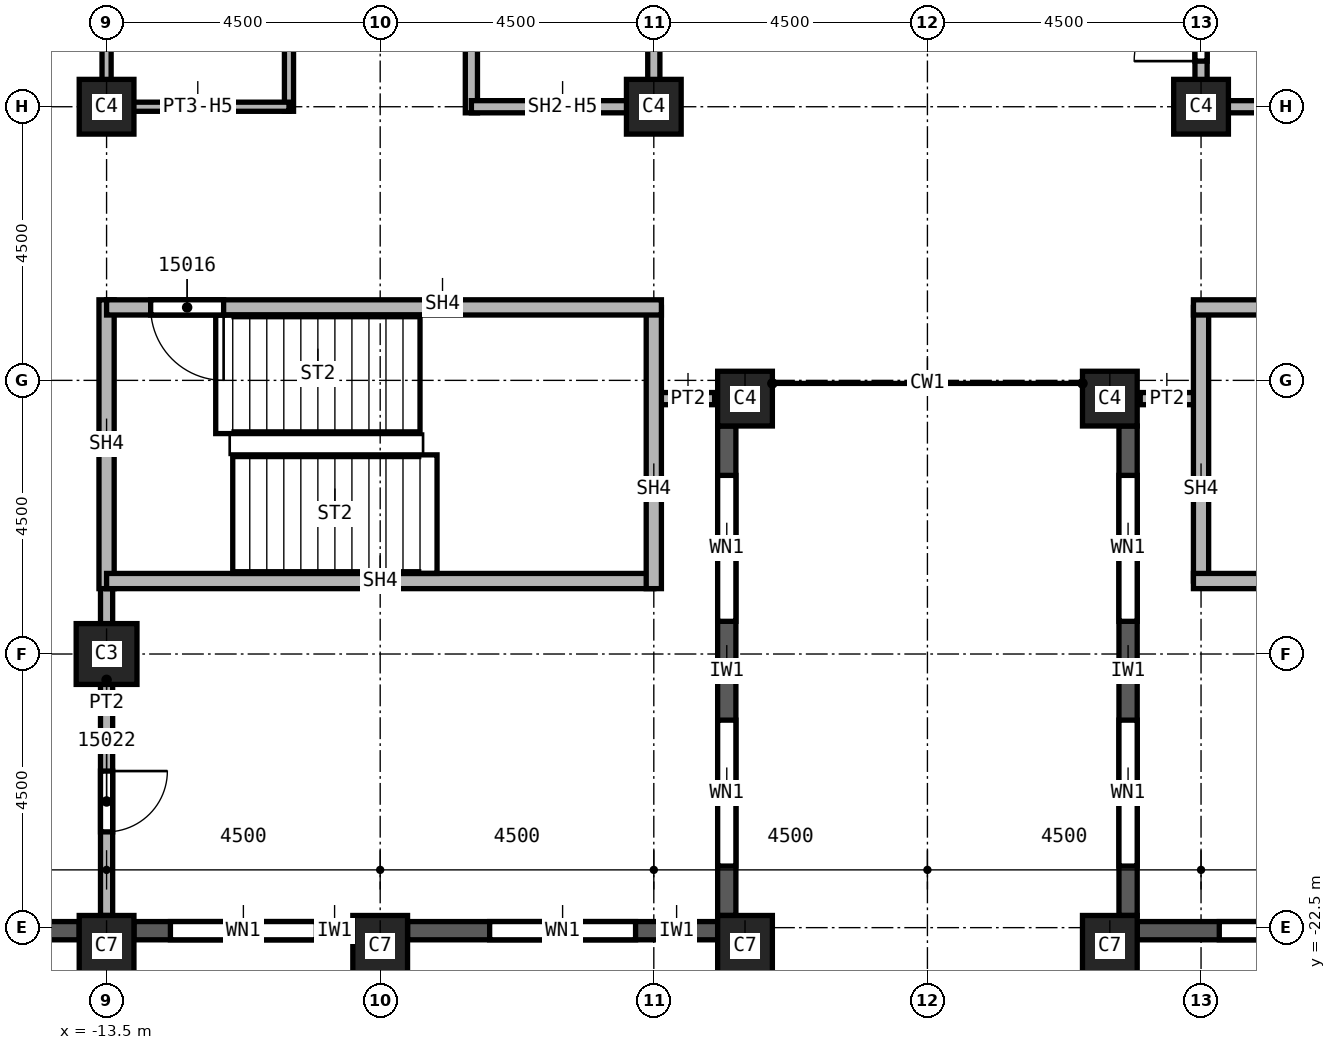
"""IFC4 building model, lengths in metres.
Left out: names, types, materials, properties, quantities, classifications, styles, units other than length and angle.
Written with IfcOpenShell. Run it as: python <this file> out.ifc"""

import sys

from ifc_helpers import new_model, si_unit, direction, frame, frame_2d, origin, origin_2d, place, context, subcontext, project, spatial, rectangle, extrude, element, fill, save


model = new_model("IFC4")
c1 = context("Model", 3, precision=1e-05, world=origin(), true_north=direction((0.0, 1.0)))
c2 = subcontext(c1, "Body", "Model", "MODEL_VIEW")
j1 = project(units=[si_unit("LENGTHUNIT", "METRE"), si_unit("PLANEANGLEUNIT", "RADIAN")], contexts=[c1])
p1 = place(None, origin())
s1 = spatial("IfcSite", under=j1, at=p1, CompositionType="ELEMENT")
p2 = place(p1, origin())
s2 = spatial("IfcBuilding", under=s1, at=p2, CompositionType="ELEMENT")
p3 = place(p2, frame((0.0, 0.0, 228.0)))
s3 = spatial("IfcBuildingStorey", under=s2, at=p3, CompositionType="ELEMENT", Elevation=228.0)
p4 = place(p3, frame((-13.5, -18.0, 0.0), z_axis=(0.0, 0.0, 1.0), x_axis=(1.0, 0.0, 0.0)))
e1 = element("IfcColumn", 1, at=p4, inside=s3, PredefinedType="COLUMN", context=c2, shape_type="SweptSolid", body=[
    extrude(rectangle(XDim=1.0, YDim=1.0, at=origin_2d()), origin(), (0.0, 0.0, 1.0), 3.72),
])
for number, where, z_axis, x_axis in (
    (2, (4.5, -9.0, 0.0), (0.0, 0.0, 1.0), (1.0, 0.0, 0.0)),
    (3, (-4.5, -9.0, 0.0), (0.0, 0.0, 1.0), (1.0, 0.0, 0.0)),
    (4, (-13.5, -9.0, 0.0), (0.0, 0.0, 1.0), (1.0, 0.0, 0.0)),
):
    element("IfcColumn", number, at=place(p3, frame(where, z_axis=z_axis, x_axis=x_axis)), inside=s3, PredefinedType="COLUMN", context=c2, shape_type="SweptSolid", body=[
        extrude(rectangle(XDim=0.9, YDim=0.9, at=origin_2d()), origin(), (0.0, 0.0, 1.0), 3.72),
    ])
for number, where, z_axis, x_axis in (
    (5, (3.0, -22.8, 0.0), (0.0, 0.0, 1.0), (1.0, 0.0, 0.0)),
    (6, (-3.0, -22.8, 0.0), (0.0, 0.0, 1.0), (1.0, 0.0, 0.0)),
    (7, (-9.0, -22.8, 0.0), (0.0, 0.0, 1.0), (1.0, 0.0, 0.0)),
    (8, (-13.5, -22.8, 0.0), (0.0, 0.0, 1.0), (1.0, 0.0, 0.0)),
):
    element("IfcColumn", number, at=place(p3, frame(where, z_axis=z_axis, x_axis=x_axis)), inside=s3, PredefinedType="COLUMN", context=c2, shape_type="SweptSolid", body=[
        extrude(rectangle(XDim=0.9, YDim=1.0, at=origin_2d()), origin(), (0.0, 0.0, 1.0), 3.72),
    ])
for number, where, z_axis, x_axis in (
    (9, (3.0, -13.8, 0.0), (0.0, 0.0, 1.0), (1.0, 0.0, 0.0)),
    (10, (-3.0, -13.8, 0.0), (0.0, 0.0, 1.0), (1.0, 0.0, 0.0)),
):
    element("IfcColumn", number, at=place(p3, frame(where, z_axis=z_axis, x_axis=x_axis)), inside=s3, PredefinedType="COLUMN", context=c2, shape_type="SweptSolid", body=[
        extrude(rectangle(XDim=0.9, YDim=0.9, at=origin_2d()), origin(), (0.0, 0.0, 1.0), 3.72),
    ])
p5 = place(p3, frame((-17.55, -22.55, 0.0), z_axis=(0.0, 0.0, 1.0), x_axis=(1.0, 0.0, 0.0)))
e11 = element("IfcWall", 11, at=p5, inside=s3, PredefinedType="SOLIDWALL", context=c2, shape_type="SweptSolid", body=[
    extrude(rectangle(XDim=3.6, YDim=0.3, at=frame_2d((1.8, 0.0))), origin(), (0.0, 0.0, 1.0), 3.12),
])
p6 = place(p5, frame((0.775, 0.0, 0.8)))
e12 = element("IfcOpeningElement", 12, at=p6, cuts=e11, PredefinedType="OPENING", context=c2, shape_type="SweptSolid", body=[
    extrude(rectangle(XDim=1.0, YDim=1.95, at=frame_2d((0.5, 0.975))), frame((0.0, 0.15, 0.0), z_axis=(0.0, -1.0, 0.0), x_axis=(1.0, 0.0, 0.0)), (0.0, 0.0, 1.0), 0.3),
])
p7 = place(p5, frame((2.375, 0.0, 0.8)))
e13 = element("IfcOpeningElement", 13, at=p7, cuts=e11, PredefinedType="OPENING", context=c2, shape_type="SweptSolid", body=[
    extrude(rectangle(XDim=0.6, YDim=1.95, at=frame_2d((0.3, 0.975))), frame((0.0, 0.15, 0.0), z_axis=(0.0, -1.0, 0.0), x_axis=(1.0, 0.0, 0.0)), (0.0, 0.0, 1.0), 0.3),
])
p8 = place(p3, frame((-13.05, -22.55, 0.0), z_axis=(0.0, 0.0, 1.0), x_axis=(1.0, 0.0, 0.0)))
e14 = element("IfcWall", 14, at=p8, inside=s3, PredefinedType="SOLIDWALL", context=c2, shape_type="SweptSolid", body=[
    extrude(rectangle(XDim=3.6, YDim=0.3, at=frame_2d((1.8, 0.0))), origin(), (0.0, 0.0, 1.0), 3.12),
])
p9 = place(p8, frame((0.6, 0.0, 0.8)))
e15 = element("IfcOpeningElement", 15, at=p9, cuts=e14, PredefinedType="OPENING", context=c2, shape_type="SweptSolid", body=[
    extrude(rectangle(XDim=2.4, YDim=1.95, at=frame_2d((1.2, 0.975))), frame((0.0, 0.15, 0.0), z_axis=(0.0, -1.0, 0.0), x_axis=(1.0, 0.0, 0.0)), (0.0, 0.0, 1.0), 0.3),
])
p10 = place(p3, frame((-8.55, -22.55, 0.0), z_axis=(0.0, 0.0, 1.0), x_axis=(1.0, 0.0, 0.0)))
e16 = element("IfcWall", 16, at=p10, inside=s3, PredefinedType="SOLIDWALL", context=c2, shape_type="SweptSolid", body=[
    extrude(rectangle(XDim=5.1, YDim=0.3, at=frame_2d((2.55, 0.0))), origin(), (0.0, 0.0, 1.0), 3.12),
])
p11 = place(p10, frame((1.35, 0.0, 0.8)))
e17 = element("IfcOpeningElement", 17, at=p11, cuts=e16, PredefinedType="OPENING", context=c2, shape_type="SweptSolid", body=[
    extrude(rectangle(XDim=2.4, YDim=1.95, at=frame_2d((1.2, 0.975))), frame((0.0, 0.15, 0.0), z_axis=(0.0, -1.0, 0.0), x_axis=(1.0, 0.0, 0.0)), (0.0, 0.0, 1.0), 0.3),
])
p12 = place(p3, frame((-3.3, -22.3, 0.0), z_axis=(0.0, 0.0, 1.0), x_axis=(0.0, 1.0, 0.0)))
e18 = element("IfcWall", 18, at=p12, inside=s3, PredefinedType="SOLIDWALL", context=c2, shape_type="SweptSolid", body=[
    extrude(rectangle(XDim=8.05, YDim=0.3, at=frame_2d((4.025, 0.0))), origin(), (0.0, 0.0, 1.0), 3.12),
])
p13 = place(p12, frame((0.812, 0.0, 0.8)))
e19 = element("IfcOpeningElement", 19, at=p13, cuts=e18, PredefinedType="OPENING", context=c2, shape_type="SweptSolid", body=[
    extrude(rectangle(XDim=2.4, YDim=1.95, at=frame_2d((1.2, 0.975))), frame((0.0, 0.15, 0.0), z_axis=(0.0, -1.0, 0.0), x_axis=(1.0, 0.0, 0.0)), (0.0, 0.0, 1.0), 0.3),
])
p14 = place(p12, frame((4.837, 0.0, 0.8)))
e20 = element("IfcOpeningElement", 20, at=p14, cuts=e18, PredefinedType="OPENING", context=c2, shape_type="SweptSolid", body=[
    extrude(rectangle(XDim=2.4, YDim=1.95, at=frame_2d((1.2, 0.975))), frame((0.0, 0.15, 0.0), z_axis=(0.0, -1.0, 0.0), x_axis=(1.0, 0.0, 0.0)), (0.0, 0.0, 1.0), 0.3),
])
p15 = place(p3, frame((3.3, -14.25, 0.0), z_axis=(0.0, 0.0, 1.0), x_axis=(0.0, -1.0, 0.0)))
e21 = element("IfcWall", 21, at=p15, inside=s3, PredefinedType="SOLIDWALL", context=c2, shape_type="SweptSolid", body=[
    extrude(rectangle(XDim=8.05, YDim=0.3, at=frame_2d((4.025, 0.0))), origin(), (0.0, 0.0, 1.0), 3.12),
])
p16 = place(p15, frame((0.812, 0.0, 0.8)))
e22 = element("IfcOpeningElement", 22, at=p16, cuts=e21, PredefinedType="OPENING", context=c2, shape_type="SweptSolid", body=[
    extrude(rectangle(XDim=2.4, YDim=1.95, at=frame_2d((1.2, 0.975))), frame((0.0, 0.15, 0.0), z_axis=(0.0, -1.0, 0.0), x_axis=(1.0, 0.0, 0.0)), (0.0, 0.0, 1.0), 0.3),
])
p17 = place(p15, frame((4.837, 0.0, 0.8)))
e23 = element("IfcOpeningElement", 23, at=p17, cuts=e21, PredefinedType="OPENING", context=c2, shape_type="SweptSolid", body=[
    extrude(rectangle(XDim=2.4, YDim=1.95, at=frame_2d((1.2, 0.975))), frame((0.0, 0.15, 0.0), z_axis=(0.0, -1.0, 0.0), x_axis=(1.0, 0.0, 0.0)), (0.0, 0.0, 1.0), 0.3),
])
p18 = place(p3, frame((3.45, -22.55, 0.0), z_axis=(0.0, 0.0, 1.0), x_axis=(1.0, 0.0, 0.0)))
e24 = element("IfcWall", 24, at=p18, inside=s3, PredefinedType="SOLIDWALL", context=c2, shape_type="SweptSolid", body=[
    extrude(rectangle(XDim=5.1, YDim=0.3, at=frame_2d((2.55, 0.0))), origin(), (0.0, 0.0, 1.0), 3.12),
])
p19 = place(p18, frame((1.35, 0.0, 0.8)))
e25 = element("IfcOpeningElement", 25, at=p19, cuts=e24, PredefinedType="OPENING", context=c2, shape_type="SweptSolid", body=[
    extrude(rectangle(XDim=2.4, YDim=1.95, at=frame_2d((1.2, 0.975))), frame((0.0, 0.15, 0.0), z_axis=(0.0, -1.0, 0.0), x_axis=(1.0, 0.0, 0.0)), (0.0, 0.0, 1.0), 0.3),
])
p20 = place(p3, frame((-13.5, -16.675, 0.0), z_axis=(0.0, 0.0, 1.0), x_axis=(0.0, -1.0, 0.0)))
e26 = element("IfcWall", 26, at=p20, inside=s3, PredefinedType="PARTITIONING", context=c2, shape_type="SweptSolid", body=[
    extrude(rectangle(XDim=5.625, YDim=0.2, at=frame_2d((2.812, 0.0))), origin(), (0.0, 0.0, 1.0), 3.72),
])
p21 = place(p20, frame((3.25, 0.0, 0.0)))
e27 = element("IfcOpeningElement", 27, at=p21, cuts=e26, PredefinedType="OPENING", context=c2, shape_type="SweptSolid", body=[
    extrude(rectangle(XDim=1.0, YDim=2.1, at=frame_2d((0.5, 1.05))), frame((0.0, 0.1, 0.0), z_axis=(0.0, -1.0, 0.0), x_axis=(1.0, 0.0, 0.0)), (0.0, 0.0, 1.0), 0.2),
])
for number, where, z_axis, x_axis in (
    (28, (-3.5, -13.8, 0.0), (0.0, 0.0, 1.0), (-1.0, 0.0, 0.0)),
    (29, (4.5, -13.8, 0.0), (0.0, 0.0, 1.0), (-1.0, 0.0, 0.0)),
):
    element("IfcWall", number, at=place(p3, frame(where, z_axis=z_axis, x_axis=x_axis)), inside=s3, PredefinedType="PARTITIONING", context=c2, shape_type="SweptSolid", body=[
        extrude(rectangle(XDim=1.0, YDim=0.2, at=frame_2d((0.5, 0.0))), origin(), (0.0, 0.0, 1.0), 3.72),
    ])
p22 = place(p3, frame((-7.5, -9.1, 0.0), z_axis=(0.0, 0.0, 1.0), x_axis=(0.0, 1.0, 0.0)))
e30 = element("IfcWall", 30, at=p22, inside=s3, PredefinedType="SOLIDWALL", context=c2, shape_type="SweptSolid", body=[
    extrude(rectangle(XDim=6.225, YDim=0.2, at=frame_2d((3.113, 0.0))), origin(), (0.0, 0.0, 1.0), 3.72),
])
p23 = place(p3, frame((-4.5, -9.0, 0.0), z_axis=(0.0, 0.0, 1.0), x_axis=(-1.0, 0.0, 0.0)))
e31 = element("IfcWall", 31, at=p23, inside=s3, PredefinedType="SOLIDWALL", context=c2, shape_type="SweptSolid", body=[
    extrude(rectangle(XDim=3.0, YDim=0.2, at=frame_2d((1.5, 0.0))), origin(), (0.0, 0.0, 1.0), 2.958),
])
p24 = place(p3, frame((-4.5, 0.0, 0.0), z_axis=(0.0, 0.0, 1.0), x_axis=(0.0, -1.0, 0.0)))
e32 = element("IfcWall", 32, at=p24, inside=s3, PredefinedType="SOLIDWALL", context=c2, shape_type="SweptSolid", body=[
    extrude(rectangle(XDim=9.1, YDim=0.2, at=frame_2d((4.55, 0.0))), origin(), (0.0, 0.0, 1.0), 2.958),
])
p25 = place(p24, frame((1.3, 0.0, 0.0)))
e33 = element("IfcOpeningElement", 33, at=p25, cuts=e32, PredefinedType="OPENING", context=c2, shape_type="SweptSolid", body=[
    extrude(rectangle(XDim=1.1, YDim=2.1, at=frame_2d((0.55, 1.05))), frame((0.0, 0.1, 0.0), z_axis=(0.0, -1.0, 0.0), x_axis=(1.0, 0.0, 0.0)), (0.0, 0.0, 1.0), 0.2),
])
p26 = place(p3, frame((4.5, -9.1, 0.0), z_axis=(0.0, 0.0, 1.0), x_axis=(0.0, 1.0, 0.0)))
e34 = element("IfcWall", 34, at=p26, inside=s3, PredefinedType="SOLIDWALL", context=c2, shape_type="SweptSolid", body=[
    extrude(rectangle(XDim=3.1, YDim=0.2, at=frame_2d((1.55, 0.0))), origin(), (0.0, 0.0, 1.0), 2.958),
])
p27 = place(p26, frame((0.85, 0.0, 0.0)))
e35 = element("IfcOpeningElement", 35, at=p27, cuts=e34, PredefinedType="OPENING", context=c2, shape_type="SweptSolid", body=[
    extrude(rectangle(XDim=1.1, YDim=2.1, at=frame_2d((0.55, 1.05))), frame((0.0, 0.1, 0.0), z_axis=(0.0, -1.0, 0.0), x_axis=(1.0, 0.0, 0.0)), (0.0, 0.0, 1.0), 0.2),
])
p28 = place(p3, frame((7.5, -9.0, 0.0), z_axis=(0.0, 0.0, 1.0), x_axis=(-1.0, 0.0, 0.0)))
e36 = element("IfcWall", 36, at=p28, inside=s3, PredefinedType="SOLIDWALL", context=c2, shape_type="SweptSolid", body=[
    extrude(rectangle(XDim=3.0, YDim=0.2, at=frame_2d((1.5, 0.0))), origin(), (0.0, 0.0, 1.0), 2.958),
])
p29 = place(p3, frame((-13.5, -12.175, 0.0), z_axis=(0.0, 0.0, 1.0), x_axis=(0.0, -1.0, 0.0)))
e37 = element("IfcWall", 37, at=p29, inside=s3, PredefinedType="SOLIDWALL", context=c2, shape_type="SweptSolid", body=[
    extrude(rectangle(XDim=4.75, YDim=0.25, at=frame_2d((2.375, 0.0))), origin(), (0.0, 0.0, 1.0), 3.72),
])
p30 = place(p3, frame((-4.5, -16.8, 0.0), z_axis=(0.0, 0.0, 1.0), x_axis=(-1.0, 0.0, 0.0)))
e38 = element("IfcWall", 38, at=p30, inside=s3, PredefinedType="SOLIDWALL", context=c2, shape_type="SweptSolid", body=[
    extrude(rectangle(XDim=9.0, YDim=0.25, at=frame_2d((4.5, 0.0))), origin(), (0.0, 0.0, 1.0), 3.72),
])
p31 = place(p3, frame((-4.5, -12.3, 0.0), z_axis=(0.0, 0.0, 1.0), x_axis=(0.0, -1.0, 0.0)))
e39 = element("IfcWall", 39, at=p31, inside=s3, PredefinedType="SOLIDWALL", context=c2, shape_type="SweptSolid", body=[
    extrude(rectangle(XDim=4.625, YDim=0.25, at=frame_2d((2.312, 0.0))), origin(), (0.0, 0.0, 1.0), 3.72),
])
p32 = place(p3, frame((-4.375, -12.3, 0.0), z_axis=(0.0, 0.0, 1.0), x_axis=(-1.0, 0.0, 0.0)))
e40 = element("IfcWall", 40, at=p32, inside=s3, PredefinedType="SOLIDWALL", context=c2, shape_type="SweptSolid", body=[
    extrude(rectangle(XDim=9.125, YDim=0.25, at=frame_2d((4.562, 0.0))), origin(), (0.0, 0.0, 1.0), 3.72),
])
p33 = place(p32, frame((7.2, 0.0, 0.0)))
e41 = element("IfcOpeningElement", 41, at=p33, cuts=e40, PredefinedType="OPENING", context=c2, shape_type="SweptSolid", body=[
    extrude(rectangle(XDim=1.2, YDim=2.1, at=frame_2d((0.6, 1.05))), frame((0.0, 0.125, 0.0), z_axis=(0.0, -1.0, 0.0), x_axis=(1.0, 0.0, 0.0)), (0.0, 0.0, 1.0), 0.25),
])
p34 = place(p3, frame((4.5, -16.8, 0.0), z_axis=(0.0, 0.0, 1.0), x_axis=(0.0, 1.0, 0.0)))
e42 = element("IfcWall", 42, at=p34, inside=s3, PredefinedType="SOLIDWALL", context=c2, shape_type="SweptSolid", body=[
    extrude(rectangle(XDim=4.5, YDim=0.25, at=frame_2d((2.25, 0.0))), origin(), (0.0, 0.0, 1.0), 3.72),
])
p35 = place(p3, frame((13.5, -16.8, 0.0), z_axis=(0.0, 0.0, 1.0), x_axis=(-1.0, 0.0, 0.0)))
e43 = element("IfcWall", 43, at=p35, inside=s3, PredefinedType="SOLIDWALL", context=c2, shape_type="SweptSolid", body=[
    extrude(rectangle(XDim=9.125, YDim=0.25, at=frame_2d((4.562, 0.0))), origin(), (0.0, 0.0, 1.0), 3.72),
])
p36 = place(p3, frame((13.5, -12.3, 0.0), z_axis=(0.0, 0.0, 1.0), x_axis=(-1.0, 0.0, 0.0)))
e44 = element("IfcWall", 44, at=p36, inside=s3, PredefinedType="SOLIDWALL", context=c2, shape_type="SweptSolid", body=[
    extrude(rectangle(XDim=9.125, YDim=0.25, at=frame_2d((4.562, 0.0))), origin(), (0.0, 0.0, 1.0), 3.72),
])
p37 = place(p36, frame((0.6, 0.0, 0.0)))
e45 = element("IfcOpeningElement", 45, at=p37, cuts=e44, PredefinedType="OPENING", context=c2, shape_type="SweptSolid", body=[
    extrude(rectangle(XDim=1.2, YDim=2.1, at=frame_2d((0.6, 1.05))), frame((0.0, 0.125, 0.0), z_axis=(0.0, -1.0, 0.0), x_axis=(1.0, 0.0, 0.0)), (0.0, 0.0, 1.0), 0.25),
])
p38 = place(p3, frame((-13.5, -9.075, 0.0), z_axis=(0.0, 0.0, 1.0), x_axis=(0.0, 1.0, 0.0)))
e46 = element("IfcWall", 46, at=p38, inside=s3, PredefinedType="PARTITIONING", context=c2, shape_type="SweptSolid", body=[
    extrude(rectangle(XDim=6.075, YDim=0.15, at=frame_2d((3.038, 0.0))), origin(), (0.0, 0.0, 1.0), 2.958),
])
p39 = place(p3, frame((-10.5, -9.075, 0.0), z_axis=(0.0, 0.0, 1.0), x_axis=(0.0, 1.0, 0.0)))
e47 = element("IfcWall", 47, at=p39, inside=s3, PredefinedType="PARTITIONING", context=c2, shape_type="SweptSolid", body=[
    extrude(rectangle(XDim=6.2, YDim=0.15, at=frame_2d((3.1, 0.0))), origin(), (0.0, 0.0, 1.0), 3.72),
])
p40 = place(p39, frame((4.45, 0.0, 0.0)))
e48 = element("IfcOpeningElement", 48, at=p40, cuts=e47, PredefinedType="OPENING", context=c2, shape_type="SweptSolid", body=[
    extrude(rectangle(XDim=0.9, YDim=2.1, at=frame_2d((0.45, 1.05))), frame((0.0, 0.075, 0.0), z_axis=(0.0, -1.0, 0.0), x_axis=(1.0, 0.0, 0.0)), (0.0, 0.0, 1.0), 0.15),
])
p41 = place(p3, frame((-10.5, -9.0, 0.0), z_axis=(0.0, 0.0, 1.0), x_axis=(-1.0, 0.0, 0.0)))
e49 = element("IfcWall", 49, at=p41, inside=s3, PredefinedType="PARTITIONING", context=c2, shape_type="SweptSolid", body=[
    extrude(rectangle(XDim=3.0, YDim=0.15, at=frame_2d((1.5, 0.0))), origin(), (0.0, 0.0, 1.0), 2.958),
])
p42 = place(p9, origin())
e50 = element("IfcWindow", 50, at=p42, inside=s3, PartitioningType="SINGLE_PANEL", PredefinedType="WINDOW", context=c2, shape_type="SweptSolid", body=[
    extrude(rectangle(XDim=2.4, YDim=1.95, at=frame_2d((1.2, 0.975))), frame((0.0, 0.03, 0.0), z_axis=(0.0, -1.0, 0.0), x_axis=(1.0, 0.0, 0.0)), (0.0, 0.0, 1.0), 0.06),
])
fill(e15, e50)
p43 = place(p11, origin())
e51 = element("IfcWindow", 51, at=p43, inside=s3, PartitioningType="SINGLE_PANEL", PredefinedType="WINDOW", context=c2, shape_type="SweptSolid", body=[
    extrude(rectangle(XDim=2.4, YDim=1.95, at=frame_2d((1.2, 0.975))), frame((0.0, 0.03, 0.0), z_axis=(0.0, -1.0, 0.0), x_axis=(1.0, 0.0, 0.0)), (0.0, 0.0, 1.0), 0.06),
])
fill(e17, e51)
p44 = place(p13, origin())
e52 = element("IfcWindow", 52, at=p44, inside=s3, PartitioningType="SINGLE_PANEL", PredefinedType="WINDOW", context=c2, shape_type="SweptSolid", body=[
    extrude(rectangle(XDim=2.4, YDim=1.95, at=frame_2d((1.2, 0.975))), frame((0.0, 0.03, 0.0), z_axis=(0.0, -1.0, 0.0), x_axis=(1.0, 0.0, 0.0)), (0.0, 0.0, 1.0), 0.06),
])
fill(e19, e52)
p45 = place(p14, origin())
e53 = element("IfcWindow", 53, at=p45, inside=s3, PartitioningType="SINGLE_PANEL", PredefinedType="WINDOW", context=c2, shape_type="SweptSolid", body=[
    extrude(rectangle(XDim=2.4, YDim=1.95, at=frame_2d((1.2, 0.975))), frame((0.0, 0.03, 0.0), z_axis=(0.0, -1.0, 0.0), x_axis=(1.0, 0.0, 0.0)), (0.0, 0.0, 1.0), 0.06),
])
fill(e20, e53)
p46 = place(p16, origin())
e54 = element("IfcWindow", 54, at=p46, inside=s3, PartitioningType="SINGLE_PANEL", PredefinedType="WINDOW", context=c2, shape_type="SweptSolid", body=[
    extrude(rectangle(XDim=2.4, YDim=1.95, at=frame_2d((1.2, 0.975))), frame((0.0, 0.03, 0.0), z_axis=(0.0, -1.0, 0.0), x_axis=(1.0, 0.0, 0.0)), (0.0, 0.0, 1.0), 0.06),
])
fill(e22, e54)
p47 = place(p17, origin())
e55 = element("IfcWindow", 55, at=p47, inside=s3, PartitioningType="SINGLE_PANEL", PredefinedType="WINDOW", context=c2, shape_type="SweptSolid", body=[
    extrude(rectangle(XDim=2.4, YDim=1.95, at=frame_2d((1.2, 0.975))), frame((0.0, 0.03, 0.0), z_axis=(0.0, -1.0, 0.0), x_axis=(1.0, 0.0, 0.0)), (0.0, 0.0, 1.0), 0.06),
])
fill(e23, e55)
p48 = place(p19, origin())
e56 = element("IfcWindow", 56, at=p48, inside=s3, PartitioningType="SINGLE_PANEL", PredefinedType="WINDOW", context=c2, shape_type="SweptSolid", body=[
    extrude(rectangle(XDim=2.4, YDim=1.95, at=frame_2d((1.2, 0.975))), frame((0.0, 0.03, 0.0), z_axis=(0.0, -1.0, 0.0), x_axis=(1.0, 0.0, 0.0)), (0.0, 0.0, 1.0), 0.06),
])
fill(e25, e56)
p49 = place(p27, origin())
e57 = element("IfcDoor", 57, at=p49, inside=s3, OperationType="SINGLE_SWING_LEFT", PredefinedType="DOOR", context=c2, shape_type="SweptSolid", body=[
    extrude(rectangle(XDim=1.1, YDim=2.1, at=frame_2d((0.55, 1.05))), frame((0.0, 0.025, 0.0), z_axis=(0.0, -1.0, 0.0), x_axis=(1.0, 0.0, 0.0)), (0.0, 0.0, 1.0), 0.05),
])
fill(e35, e57)
p50 = place(p33, origin())
e58 = element("IfcDoor", 58, at=p50, inside=s3, OperationType="SINGLE_SWING_LEFT", PredefinedType="DOOR", context=c2, shape_type="SweptSolid", body=[
    extrude(rectangle(XDim=1.2, YDim=2.1, at=frame_2d((0.6, 1.05))), frame((0.0, 0.025, 0.0), z_axis=(0.0, -1.0, 0.0), x_axis=(1.0, 0.0, 0.0)), (0.0, 0.0, 1.0), 0.05),
])
fill(e41, e58)
p51 = place(p21, origin())
e59 = element("IfcDoor", 59, at=p51, inside=s3, OperationType="SINGLE_SWING_LEFT", PredefinedType="DOOR", context=c2, shape_type="SweptSolid", body=[
    extrude(rectangle(XDim=1.0, YDim=2.1, at=frame_2d((0.5, 1.05))), frame((0.0, 0.025, 0.0), z_axis=(0.0, -1.0, 0.0), x_axis=(1.0, 0.0, 0.0)), (0.0, 0.0, 1.0), 0.05),
])
fill(e27, e59)
save(model, sys.argv[1])
